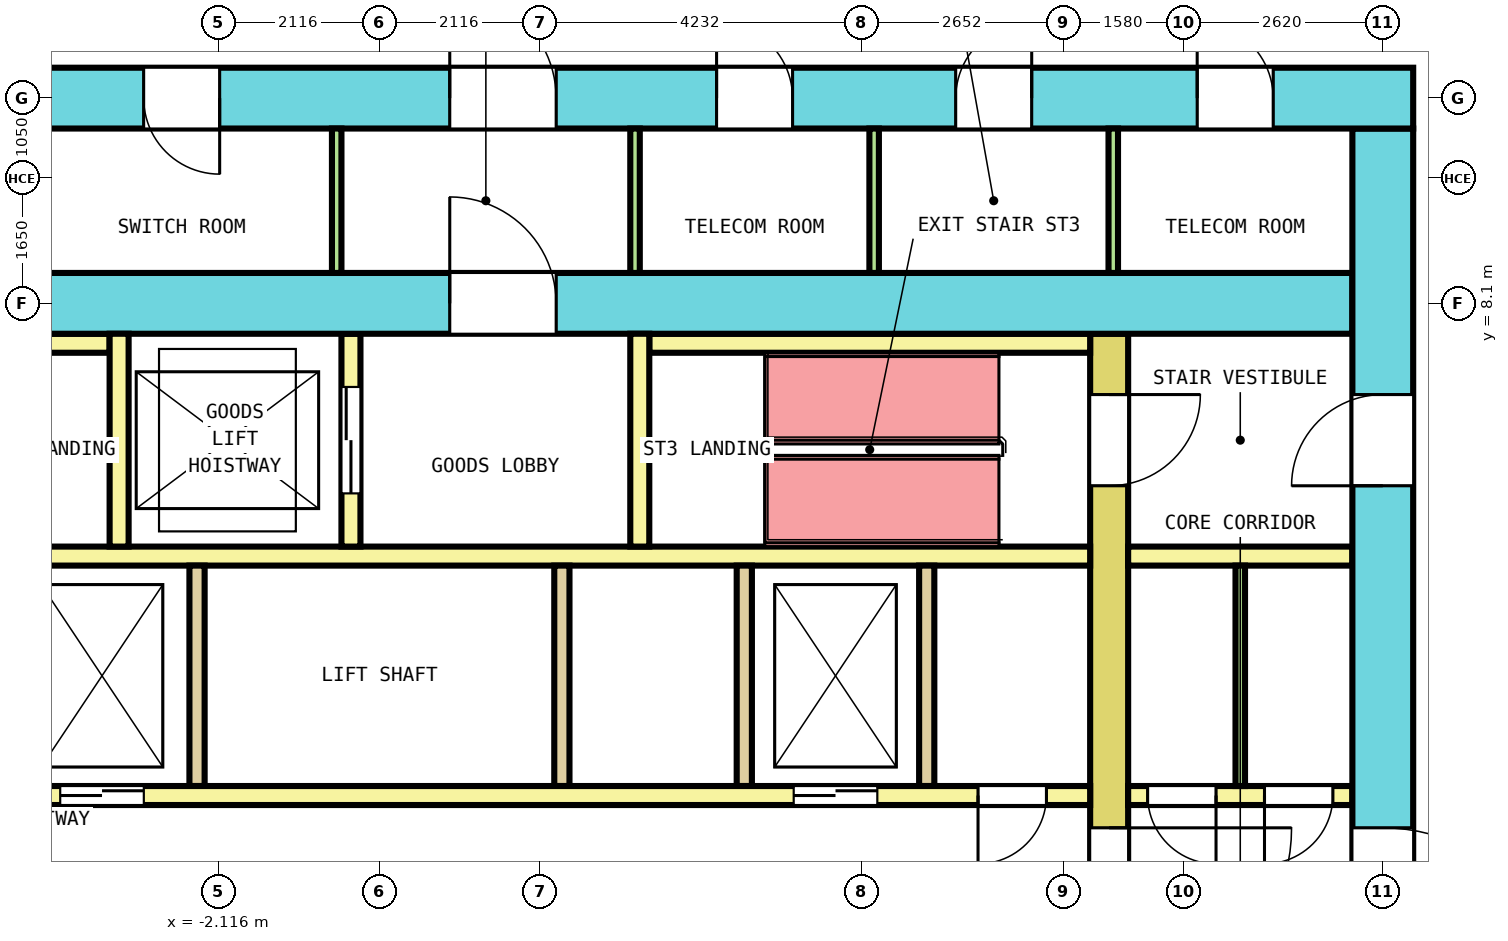
"""IFC4 building model, lengths in metres.
Left out: names, types, materials, properties, quantities, classifications, styles, units other than length and angle.
Written with IfcOpenShell. Run it as: python <this file> out.ifc"""

import sys

from ifc_helpers import new_model, si_unit, direction, frame, frame_2d, origin, place, context, subcontext, project, spatial, rectangle, extrude, element, fill, save


model = new_model("IFC4")
c1 = context("Model", 3, precision=1e-05, world=origin(), true_north=direction((0.0, 1.0)))
c2 = subcontext(c1, "Body", "Model", "MODEL_VIEW")
j1 = project(units=[si_unit("LENGTHUNIT", "METRE"), si_unit("PLANEANGLEUNIT", "RADIAN")], contexts=[c1])
p1 = place(None, origin())
s1 = spatial("IfcSite", under=j1, at=p1, CompositionType="ELEMENT")
p2 = place(p1, origin())
s2 = spatial("IfcBuilding", under=s1, at=p2, CompositionType="ELEMENT")
p3 = place(p2, frame((0.0, 0.0, 117.6)))
s3 = spatial("IfcBuildingStorey", under=s2, at=p3, CompositionType="ELEMENT", Elevation=117.6)
p4 = place(p3, frame((-13.6, 10.8, 0.0), z_axis=(0.0, 0.0, 1.0), x_axis=(1.0, 0.0, 0.0)))
e1 = element("IfcWall", 1, at=p4, inside=s3, PredefinedType="SHEAR", context=c2, shape_type="SweptSolid", body=[
    extrude(rectangle(XDim=27.2, YDim=0.8, at=frame_2d((13.6, 0.0))), origin(), (0.0, 0.0, 1.0), 4.1),
])
p5 = place(p4, frame((2.308, 0.0, 0.0)))
e2 = element("IfcOpeningElement", 2, at=p5, cuts=e1, PredefinedType="OPENING", context=c2, shape_type="SweptSolid", body=[
    extrude(rectangle(XDim=1.0, YDim=2.1, at=frame_2d((0.5, 1.05))), frame((0.0, 0.41, 0.0), z_axis=(0.0, -1.0, 0.0), x_axis=(1.0, 0.0, 0.0)), (0.0, 0.0, 1.0), 0.82),
])
p6 = place(p4, frame((6.419, 0.0, 0.0)))
e3 = element("IfcOpeningElement", 3, at=p6, cuts=e1, PredefinedType="OPENING", context=c2, shape_type="SweptSolid", body=[
    extrude(rectangle(XDim=1.0, YDim=2.1, at=frame_2d((0.5, 1.05))), frame((0.0, 0.41, 0.0), z_axis=(0.0, -1.0, 0.0), x_axis=(1.0, 0.0, 0.0)), (0.0, 0.0, 1.0), 0.82),
])
p7 = place(p4, frame((10.498, 0.0, 0.0)))
e4 = element("IfcOpeningElement", 4, at=p7, cuts=e1, PredefinedType="OPENING", context=c2, shape_type="SweptSolid", body=[
    extrude(rectangle(XDim=1.0, YDim=2.1, at=frame_2d((0.5, 1.05))), frame((0.0, 0.41, 0.0), z_axis=(0.0, -1.0, 0.0), x_axis=(1.0, 0.0, 0.0)), (0.0, 0.0, 1.0), 0.82),
])
p8 = place(p4, frame((18.035, 0.0, 0.0)))
e5 = element("IfcOpeningElement", 5, at=p8, cuts=e1, PredefinedType="OPENING", context=c2, shape_type="SweptSolid", body=[
    extrude(rectangle(XDim=1.0, YDim=2.1, at=frame_2d((0.5, 1.05))), frame((0.0, 0.41, 0.0), z_axis=(0.0, -1.0, 0.0), x_axis=(1.0, 0.0, 0.0)), (0.0, 0.0, 1.0), 0.82),
])
p9 = place(p4, frame((21.181, 0.0, 0.0)))
e6 = element("IfcOpeningElement", 6, at=p9, cuts=e1, PredefinedType="OPENING", context=c2, shape_type="SweptSolid", body=[
    extrude(rectangle(XDim=1.0, YDim=2.1, at=frame_2d((0.5, 1.05))), frame((0.0, 0.41, 0.0), z_axis=(0.0, -1.0, 0.0), x_axis=(1.0, 0.0, 0.0)), (0.0, 0.0, 1.0), 0.82),
])
p10 = place(p4, frame((24.358, 0.0, 0.0)))
e7 = element("IfcOpeningElement", 7, at=p10, cuts=e1, PredefinedType="OPENING", context=c2, shape_type="SweptSolid", body=[
    extrude(rectangle(XDim=1.0, YDim=2.1, at=frame_2d((0.5, 1.05))), frame((0.0, 0.41, 0.0), z_axis=(0.0, -1.0, 0.0), x_axis=(1.0, 0.0, 0.0)), (0.0, 0.0, 1.0), 0.82),
])
p11 = place(p4, frame((14.525, 0.0, 0.0)))
e8 = element("IfcOpeningElement", 8, at=p11, cuts=e1, PredefinedType="OPENING", context=c2, shape_type="SweptSolid", body=[
    extrude(rectangle(XDim=1.4, YDim=2.1, at=frame_2d((0.7, 1.05))), frame((0.0, 0.41, 0.0), z_axis=(0.0, -1.0, 0.0), x_axis=(1.0, 0.0, 0.0)), (0.0, 0.0, 1.0), 0.82),
])
p12 = place(p3, frame((13.2, -10.4, 0.0), z_axis=(0.0, 0.0, 1.0), x_axis=(0.0, 1.0, 0.0)))
e9 = element("IfcWall", 9, at=p12, inside=s3, PredefinedType="SHEAR", context=c2, shape_type="SweptSolid", body=[
    extrude(rectangle(XDim=20.8, YDim=0.8, at=frame_2d((10.4, 0.0))), origin(), (0.0, 0.0, 1.0), 4.1),
])
p13 = place(p12, frame((9.2, 0.0, 0.0)))
e10 = element("IfcOpeningElement", 10, at=p13, cuts=e9, PredefinedType="OPENING", context=c2, shape_type="SweptSolid", body=[
    extrude(rectangle(XDim=2.4, YDim=2.1, at=frame_2d((1.2, 1.05))), frame((0.0, 0.41, 0.0), z_axis=(0.0, -1.0, 0.0), x_axis=(1.0, 0.0, 0.0)), (0.0, 0.0, 1.0), 0.82),
])
p14 = place(p12, frame((16.1, 0.0, 0.0)))
e11 = element("IfcOpeningElement", 11, at=p14, cuts=e9, PredefinedType="OPENING", context=c2, shape_type="SweptSolid", body=[
    extrude(rectangle(XDim=1.2, YDim=2.1, at=frame_2d((0.6, 1.05))), frame((0.0, 0.41, 0.0), z_axis=(0.0, -1.0, 0.0), x_axis=(1.0, 0.0, 0.0)), (0.0, 0.0, 1.0), 0.82),
])
p15 = place(p12, frame((3.6, 0.0, 0.0)))
e12 = element("IfcOpeningElement", 12, at=p15, cuts=e9, PredefinedType="OPENING", context=c2, shape_type="SweptSolid", body=[
    extrude(rectangle(XDim=1.0, YDim=2.1, at=frame_2d((0.5, 1.05))), frame((0.0, 0.41, 0.0), z_axis=(0.0, -1.0, 0.0), x_axis=(1.0, 0.0, 0.0)), (0.0, 0.0, 1.0), 0.82),
])
p16 = place(p3, frame((-12.8, 8.1, 0.0), z_axis=(0.0, 0.0, 1.0), x_axis=(1.0, 0.0, 0.0)))
e13 = element("IfcWall", 13, at=p16, inside=s3, PredefinedType="SHEAR", context=c2, shape_type="SweptSolid", body=[
    extrude(rectangle(XDim=25.6, YDim=0.8, at=frame_2d((12.8, 0.0))), origin(), (0.0, 0.0, 1.0), 4.1),
])
p17 = place(p16, frame((13.725, 0.0, 0.0)))
e14 = element("IfcOpeningElement", 14, at=p17, cuts=e13, PredefinedType="OPENING", context=c2, shape_type="SweptSolid", body=[
    extrude(rectangle(XDim=1.4, YDim=2.1, at=frame_2d((0.7, 1.05))), frame((0.0, 0.41, 0.0), z_axis=(0.0, -1.0, 0.0), x_axis=(1.0, 0.0, 0.0)), (0.0, 0.0, 1.0), 0.82),
])
p18 = place(p3, frame((9.6, -7.7, 0.0), z_axis=(0.0, 0.0, 1.0), x_axis=(0.0, 1.0, 0.0)))
e15 = element("IfcWall", 15, at=p18, inside=s3, PredefinedType="SHEAR", context=c2, shape_type="SweptSolid", body=[
    extrude(rectangle(XDim=15.4, YDim=0.5, at=frame_2d((7.7, 0.0))), origin(), (0.0, 0.0, 1.0), 4.1),
])
p19 = place(p18, frame((6.5, 0.0, 0.0)))
e16 = element("IfcOpeningElement", 16, at=p19, cuts=e15, PredefinedType="OPENING", context=c2, shape_type="SweptSolid", body=[
    extrude(rectangle(XDim=2.4, YDim=2.1, at=frame_2d((1.2, 1.05))), frame((0.0, 0.26, 0.0), z_axis=(0.0, -1.0, 0.0), x_axis=(1.0, 0.0, 0.0)), (0.0, 0.0, 1.0), 0.52),
])
p20 = place(p18, frame((13.4, 0.0, 0.0)))
e17 = element("IfcOpeningElement", 17, at=p20, cuts=e15, PredefinedType="OPENING", context=c2, shape_type="SweptSolid", body=[
    extrude(rectangle(XDim=1.2, YDim=2.1, at=frame_2d((0.6, 1.05))), frame((0.0, 0.26, 0.0), z_axis=(0.0, -1.0, 0.0), x_axis=(1.0, 0.0, 0.0)), (0.0, 0.0, 1.0), 0.52),
])
p21 = place(p18, frame((0.9, 0.0, 0.0)))
e18 = element("IfcOpeningElement", 18, at=p21, cuts=e15, PredefinedType="OPENING", context=c2, shape_type="SweptSolid", body=[
    extrude(rectangle(XDim=1.0, YDim=2.1, at=frame_2d((0.5, 1.05))), frame((0.0, 0.26, 0.0), z_axis=(0.0, -1.0, 0.0), x_axis=(1.0, 0.0, 0.0)), (0.0, 0.0, 1.0), 0.52),
])
p22 = place(p3, frame((-9.35, 1.625, 0.0), z_axis=(0.0, 0.0, 1.0), x_axis=(1.0, 0.0, 0.0)))
e19 = element("IfcWall", 19, at=p22, inside=s3, PredefinedType="SOLIDWALL", context=c2, shape_type="SweptSolid", body=[
    extrude(rectangle(XDim=18.7, YDim=0.25, at=frame_2d((9.35, 0.0))), origin(), (0.0, 0.0, 1.0), 4.1),
])
p23 = place(p22, frame((2.85, 0.0, 0.0)))
e20 = element("IfcOpeningElement", 20, at=p23, cuts=e19, PredefinedType="OPENING", context=c2, shape_type="SweptSolid", body=[
    extrude(rectangle(XDim=1.1, YDim=2.1, at=frame_2d((0.55, 1.05))), frame((0.0, 0.135, 0.0), z_axis=(0.0, -1.0, 0.0), x_axis=(1.0, 0.0, 0.0)), (0.0, 0.0, 1.0), 0.27),
])
p24 = place(p22, frame((5.15, 0.0, 0.0)))
e21 = element("IfcOpeningElement", 21, at=p24, cuts=e19, PredefinedType="OPENING", context=c2, shape_type="SweptSolid", body=[
    extrude(rectangle(XDim=1.1, YDim=2.1, at=frame_2d((0.55, 1.05))), frame((0.0, 0.135, 0.0), z_axis=(0.0, -1.0, 0.0), x_axis=(1.0, 0.0, 0.0)), (0.0, 0.0, 1.0), 0.27),
])
p25 = place(p22, frame((14.8, 0.0, 0.0)))
e22 = element("IfcOpeningElement", 22, at=p25, cuts=e19, PredefinedType="OPENING", context=c2, shape_type="SweptSolid", body=[
    extrude(rectangle(XDim=1.1, YDim=2.1, at=frame_2d((0.55, 1.05))), frame((0.0, 0.135, 0.0), z_axis=(0.0, -1.0, 0.0), x_axis=(1.0, 0.0, 0.0)), (0.0, 0.0, 1.0), 0.27),
])
p26 = place(p22, frame((0.575, 0.0, 0.0)))
e23 = element("IfcOpeningElement", 23, at=p26, cuts=e19, PredefinedType="OPENING", context=c2, shape_type="SweptSolid", body=[
    extrude(rectangle(XDim=0.9, YDim=2.1, at=frame_2d((0.45, 1.05))), frame((0.0, 0.135, 0.0), z_axis=(0.0, -1.0, 0.0), x_axis=(1.0, 0.0, 0.0)), (0.0, 0.0, 1.0), 0.27),
])
p27 = place(p22, frame((17.225, 0.0, 0.0)))
e24 = element("IfcOpeningElement", 24, at=p27, cuts=e19, PredefinedType="OPENING", context=c2, shape_type="SweptSolid", body=[
    extrude(rectangle(XDim=0.9, YDim=2.1, at=frame_2d((0.45, 1.05))), frame((0.0, 0.135, 0.0), z_axis=(0.0, -1.0, 0.0), x_axis=(1.0, 0.0, 0.0)), (0.0, 0.0, 1.0), 0.27),
])
p28 = place(p3, frame((9.85, 1.625, 0.0), z_axis=(0.0, 0.0, 1.0), x_axis=(1.0, 0.0, 0.0)))
e25 = element("IfcWall", 25, at=p28, inside=s3, PredefinedType="SOLIDWALL", context=c2, shape_type="SweptSolid", body=[
    extrude(rectangle(XDim=2.95, YDim=0.25, at=frame_2d((1.475, 0.0))), origin(), (0.0, 0.0, 1.0), 4.1),
])
p29 = place(p28, frame((0.256, 0.0, 0.0)))
e26 = element("IfcOpeningElement", 26, at=p29, cuts=e25, PredefinedType="OPENING", context=c2, shape_type="SweptSolid", body=[
    extrude(rectangle(XDim=0.9, YDim=2.1, at=frame_2d((0.45, 1.05))), frame((0.0, 0.135, 0.0), z_axis=(0.0, -1.0, 0.0), x_axis=(1.0, 0.0, 0.0)), (0.0, 0.0, 1.0), 0.27),
])
p30 = place(p28, frame((1.794, 0.0, 0.0)))
e27 = element("IfcOpeningElement", 27, at=p30, cuts=e25, PredefinedType="OPENING", context=c2, shape_type="SweptSolid", body=[
    extrude(rectangle(XDim=0.9, YDim=2.1, at=frame_2d((0.45, 1.05))), frame((0.0, 0.135, 0.0), z_axis=(0.0, -1.0, 0.0), x_axis=(1.0, 0.0, 0.0)), (0.0, 0.0, 1.0), 0.27),
])
p31 = place(p3, frame((-9.35, 4.775, 0.0), z_axis=(0.0, 0.0, 1.0), x_axis=(1.0, 0.0, 0.0)))
e28 = element("IfcWall", 28, at=p31, inside=s3, PredefinedType="SOLIDWALL", context=c2, shape_type="SweptSolid", body=[
    extrude(rectangle(XDim=18.7, YDim=0.25, at=frame_2d((9.35, 0.0))), origin(), (0.0, 0.0, 1.0), 4.1),
])
p32 = place(p3, frame((9.85, 4.775, 0.0), z_axis=(0.0, 0.0, 1.0), x_axis=(1.0, 0.0, 0.0)))
e29 = element("IfcWall", 29, at=p32, inside=s3, PredefinedType="SOLIDWALL", context=c2, shape_type="SweptSolid", body=[
    extrude(rectangle(XDim=2.95, YDim=0.25, at=frame_2d((1.475, 0.0))), origin(), (0.0, 0.0, 1.0), 4.1),
])
for number, where, z_axis, x_axis in (
    (30, (-2.4, 1.75, 0.0), (0.0, 0.0, 1.0), (0.0, 1.0, 0.0)),
    (31, (2.4, 1.75, 0.0), (0.0, 0.0, 1.0), (0.0, 1.0, 0.0)),
    (32, (4.8, 1.75, 0.0), (0.0, 0.0, 1.0), (0.0, 1.0, 0.0)),
    (33, (7.2, 1.75, 0.0), (0.0, 0.0, 1.0), (0.0, 1.0, 0.0)),
):
    element("IfcWall", number, at=place(p3, frame(where, z_axis=z_axis, x_axis=x_axis)), inside=s3, PredefinedType="SOLIDWALL", context=c2, shape_type="SweptSolid", body=[
        extrude(rectangle(XDim=2.9, YDim=0.2, at=frame_2d((1.45, 0.0))), origin(), (0.0, 0.0, 1.0), 4.1),
    ])
for number, where, z_axis, x_axis in (
    (34, (-9.35, 7.575, 0.0), (0.0, 0.0, 1.0), (1.0, 0.0, 0.0)),
    (35, (3.55, 7.575, 0.0), (0.0, 0.0, 1.0), (1.0, 0.0, 0.0)),
):
    element("IfcWall", number, at=place(p3, frame(where, z_axis=z_axis, x_axis=x_axis)), inside=s3, PredefinedType="SOLIDWALL", context=c2, shape_type="SweptSolid", body=[
        extrude(rectangle(XDim=5.8, YDim=0.25, at=frame_2d((2.9, 0.0))), origin(), (0.0, 0.0, 1.0), 4.1),
    ])
p33 = place(p3, frame((-3.425, 4.9, 0.0), z_axis=(0.0, 0.0, 1.0), x_axis=(0.0, 1.0, 0.0)))
e36 = element("IfcWall", 36, at=p33, inside=s3, PredefinedType="SOLIDWALL", context=c2, shape_type="SweptSolid", body=[
    extrude(rectangle(XDim=2.8, YDim=0.25, at=frame_2d((1.4, 0.0))), origin(), (0.0, 0.0, 1.0), 4.1),
])
p34 = place(p3, frame((-0.375, 4.9, 0.0), z_axis=(0.0, 0.0, 1.0), x_axis=(0.0, 1.0, 0.0)))
e37 = element("IfcWall", 37, at=p34, inside=s3, PredefinedType="SOLIDWALL", context=c2, shape_type="SweptSolid", body=[
    extrude(rectangle(XDim=2.8, YDim=0.25, at=frame_2d((1.4, 0.0))), origin(), (0.0, 0.0, 1.0), 4.1),
])
p35 = place(p34, frame((0.7, 0.0, 0.0)))
e38 = element("IfcOpeningElement", 38, at=p35, cuts=e37, PredefinedType="OPENING", context=c2, shape_type="SweptSolid", body=[
    extrude(rectangle(XDim=1.4, YDim=2.1, at=frame_2d((0.7, 1.05))), frame((0.0, 0.135, 0.0), z_axis=(0.0, -1.0, 0.0), x_axis=(1.0, 0.0, 0.0)), (0.0, 0.0, 1.0), 0.27),
])
p36 = place(p3, frame((3.425, 4.9, 0.0), z_axis=(0.0, 0.0, 1.0), x_axis=(0.0, 1.0, 0.0)))
e39 = element("IfcWall", 39, at=p36, inside=s3, PredefinedType="SOLIDWALL", context=c2, shape_type="SweptSolid", body=[
    extrude(rectangle(XDim=2.8, YDim=0.25, at=frame_2d((1.4, 0.0))), origin(), (0.0, 0.0, 1.0), 4.1),
])
p37 = place(p3, frame((-0.562, 8.5, 0.0), z_axis=(0.0, 0.0, 1.0), x_axis=(0.0, 1.0, 0.0)))
e40 = element("IfcWall", 40, at=p37, inside=s3, PredefinedType="PARTITIONING", context=c2, shape_type="SweptSolid", body=[
    extrude(rectangle(XDim=1.9, YDim=0.125, at=frame_2d((0.95, 0.0))), origin(), (0.0, 0.0, 1.0), 3.05),
])
p38 = place(p3, frame((3.363, 8.5, 0.0), z_axis=(0.0, 0.0, 1.0), x_axis=(0.0, 1.0, 0.0)))
e41 = element("IfcWall", 41, at=p38, inside=s3, PredefinedType="PARTITIONING", context=c2, shape_type="SweptSolid", body=[
    extrude(rectangle(XDim=1.9, YDim=0.125, at=frame_2d((0.95, 0.0))), origin(), (0.0, 0.0, 1.0), 4.1),
])
for number, where, z_axis, x_axis in (
    (42, (6.508, 8.5, 0.0), (0.0, 0.0, 1.0), (0.0, 1.0, 0.0)),
    (43, (9.654, 8.5, 0.0), (0.0, 0.0, 1.0), (0.0, 1.0, 0.0)),
):
    element("IfcWall", number, at=place(p3, frame(where, z_axis=z_axis, x_axis=x_axis)), inside=s3, PredefinedType="PARTITIONING", context=c2, shape_type="SweptSolid", body=[
        extrude(rectangle(XDim=1.9, YDim=0.125, at=frame_2d((0.95, 0.0))), origin(), (0.0, 0.0, 1.0), 3.05),
    ])
p39 = place(p3, frame((11.325, 1.75, 0.0), z_axis=(0.0, 0.0, 1.0), x_axis=(0.0, 1.0, 0.0)))
e44 = element("IfcWall", 44, at=p39, inside=s3, PredefinedType="PARTITIONING", context=c2, shape_type="SweptSolid", body=[
    extrude(rectangle(XDim=2.9, YDim=0.125, at=frame_2d((1.45, 0.0))), origin(), (0.0, 0.0, 1.0), 4.1),
])
p40 = place(p24, origin())
e45 = element("IfcDoor", 45, at=p40, inside=s3, OperationType="DOUBLE_DOOR_SLIDING", PredefinedType="DOOR", context=c2, shape_type="SweptSolid", body=[
    extrude(rectangle(XDim=1.1, YDim=2.1, at=frame_2d((0.55, 1.05))), frame((0.0, 0.075, 0.0), z_axis=(0.0, -1.0, 0.0), x_axis=(1.0, 0.0, 0.0)), (0.0, 0.0, 1.0), 0.15),
])
fill(e21, e45)
p41 = place(p25, origin())
e46 = element("IfcDoor", 46, at=p41, inside=s3, OperationType="DOUBLE_DOOR_SLIDING", PredefinedType="DOOR", context=c2, shape_type="SweptSolid", body=[
    extrude(rectangle(XDim=1.1, YDim=2.1, at=frame_2d((0.55, 1.05))), frame((0.0, 0.075, 0.0), z_axis=(0.0, -1.0, 0.0), x_axis=(1.0, 0.0, 0.0)), (0.0, 0.0, 1.0), 0.15),
])
fill(e22, e46)
p42 = place(p35, origin())
e47 = element("IfcDoor", 47, at=p42, inside=s3, OperationType="DOUBLE_DOOR_SLIDING", PredefinedType="DOOR", context=c2, shape_type="SweptSolid", body=[
    extrude(rectangle(XDim=1.4, YDim=2.1, at=frame_2d((0.7, 1.05))), frame((0.0, 0.075, 0.0), z_axis=(0.0, -1.0, 0.0), x_axis=(1.0, 0.0, 0.0)), (0.0, 0.0, 1.0), 0.15),
])
fill(e38, e47)
p43 = place(p19, origin())
e48 = element("IfcDoor", 48, at=p43, inside=s3, OperationType="DOUBLE_DOOR_SINGLE_SWING", PredefinedType="DOOR", context=c2, shape_type="SweptSolid", body=[
    extrude(rectangle(XDim=2.4, YDim=2.1, at=frame_2d((1.2, 1.05))), frame((0.0, 0.2, 0.0), z_axis=(0.0, -1.0, 0.0), x_axis=(1.0, 0.0, 0.0)), (0.0, 0.0, 1.0), 0.4),
])
fill(e16, e48)
p44 = place(p13, origin())
e49 = element("IfcDoor", 49, at=p44, inside=s3, OperationType="DOUBLE_DOOR_SINGLE_SWING", PredefinedType="DOOR", context=c2, shape_type="SweptSolid", body=[
    extrude(rectangle(XDim=2.4, YDim=2.1, at=frame_2d((1.2, 1.05))), frame((0.0, 0.3, 0.0), z_axis=(0.0, -1.0, 0.0), x_axis=(1.0, 0.0, 0.0)), (0.0, 0.0, 1.0), 0.6),
])
fill(e10, e49)
p45 = place(p20, origin())
e50 = element("IfcDoor", 50, at=p45, inside=s3, OperationType="SINGLE_SWING_LEFT", PredefinedType="DOOR", context=c2, shape_type="SweptSolid", body=[
    extrude(rectangle(XDim=1.2, YDim=2.1, at=frame_2d((0.6, 1.05))), frame((0.0, 0.2, 0.0), z_axis=(0.0, -1.0, 0.0), x_axis=(1.0, 0.0, 0.0)), (0.0, 0.0, 1.0), 0.4),
])
fill(e17, e50)
p46 = place(p14, origin())
e51 = element("IfcDoor", 51, at=p46, inside=s3, OperationType="SINGLE_SWING_RIGHT", PredefinedType="DOOR", context=c2, shape_type="SweptSolid", body=[
    extrude(rectangle(XDim=1.2, YDim=2.1, at=frame_2d((0.6, 1.05))), frame((0.0, 0.3, 0.0), z_axis=(0.0, -1.0, 0.0), x_axis=(1.0, 0.0, 0.0)), (0.0, 0.0, 1.0), 0.6),
])
fill(e11, e51)
p47 = place(p17, origin())
e52 = element("IfcDoor", 52, at=p47, inside=s3, OperationType="DOUBLE_DOOR_SINGLE_SWING", PredefinedType="DOOR", context=c2, shape_type="SweptSolid", body=[
    extrude(rectangle(XDim=1.4, YDim=2.1, at=frame_2d((0.7, 1.05))), frame((0.0, 0.3, 0.0), z_axis=(0.0, -1.0, 0.0), x_axis=(1.0, 0.0, 0.0)), (0.0, 0.0, 1.0), 0.6),
])
fill(e14, e52)
p48 = place(p7, origin())
e53 = element("IfcDoor", 53, at=p48, inside=s3, OperationType="SINGLE_SWING_LEFT", PredefinedType="DOOR", context=c2, shape_type="SweptSolid", body=[
    extrude(rectangle(XDim=1.0, YDim=2.1, at=frame_2d((0.5, 1.05))), frame((0.0, 0.3, 0.0), z_axis=(0.0, -1.0, 0.0), x_axis=(1.0, 0.0, 0.0)), (0.0, 0.0, 1.0), 0.6),
])
fill(e4, e53)
p49 = place(p8, origin())
e54 = element("IfcDoor", 54, at=p49, inside=s3, OperationType="SINGLE_SWING_RIGHT", PredefinedType="DOOR", context=c2, shape_type="SweptSolid", body=[
    extrude(rectangle(XDim=1.0, YDim=2.1, at=frame_2d((0.5, 1.05))), frame((0.0, 0.3, 0.0), z_axis=(0.0, -1.0, 0.0), x_axis=(1.0, 0.0, 0.0)), (0.0, 0.0, 1.0), 0.6),
])
fill(e5, e54)
p50 = place(p9, origin())
e55 = element("IfcDoor", 55, at=p50, inside=s3, OperationType="SINGLE_SWING_LEFT", PredefinedType="DOOR", context=c2, shape_type="SweptSolid", body=[
    extrude(rectangle(XDim=1.0, YDim=2.1, at=frame_2d((0.5, 1.05))), frame((0.0, 0.3, 0.0), z_axis=(0.0, -1.0, 0.0), x_axis=(1.0, 0.0, 0.0)), (0.0, 0.0, 1.0), 0.6),
])
fill(e6, e55)
p51 = place(p10, origin())
e56 = element("IfcDoor", 56, at=p51, inside=s3, OperationType="SINGLE_SWING_RIGHT", PredefinedType="DOOR", context=c2, shape_type="SweptSolid", body=[
    extrude(rectangle(XDim=1.0, YDim=2.1, at=frame_2d((0.5, 1.05))), frame((0.0, 0.3, 0.0), z_axis=(0.0, -1.0, 0.0), x_axis=(1.0, 0.0, 0.0)), (0.0, 0.0, 1.0), 0.6),
])
fill(e7, e56)
p52 = place(p11, origin())
e57 = element("IfcDoor", 57, at=p52, inside=s3, OperationType="DOUBLE_DOOR_SINGLE_SWING", PredefinedType="DOOR", context=c2, shape_type="SweptSolid", body=[
    extrude(rectangle(XDim=1.4, YDim=2.1, at=frame_2d((0.7, 1.05))), frame((0.0, 0.3, 0.0), z_axis=(0.0, -1.0, 0.0), x_axis=(1.0, 0.0, 0.0)), (0.0, 0.0, 1.0), 0.6),
])
fill(e8, e57)
p53 = place(p27, origin())
e58 = element("IfcDoor", 58, at=p53, inside=s3, OperationType="SINGLE_SWING_LEFT", PredefinedType="DOOR", context=c2, shape_type="SweptSolid", body=[
    extrude(rectangle(XDim=0.9, YDim=2.1, at=frame_2d((0.45, 1.05))), frame((0.0, 0.075, 0.0), z_axis=(0.0, -1.0, 0.0), x_axis=(1.0, 0.0, 0.0)), (0.0, 0.0, 1.0), 0.15),
])
fill(e24, e58)
p54 = place(p29, origin())
e59 = element("IfcDoor", 59, at=p54, inside=s3, OperationType="SINGLE_SWING_RIGHT", PredefinedType="DOOR", context=c2, shape_type="SweptSolid", body=[
    extrude(rectangle(XDim=0.9, YDim=2.1, at=frame_2d((0.45, 1.05))), frame((0.0, 0.075, 0.0), z_axis=(0.0, -1.0, 0.0), x_axis=(1.0, 0.0, 0.0)), (0.0, 0.0, 1.0), 0.15),
])
fill(e26, e59)
p55 = place(p30, origin())
e60 = element("IfcDoor", 60, at=p55, inside=s3, OperationType="SINGLE_SWING_LEFT", PredefinedType="DOOR", context=c2, shape_type="SweptSolid", body=[
    extrude(rectangle(XDim=0.9, YDim=2.1, at=frame_2d((0.45, 1.05))), frame((0.0, 0.075, 0.0), z_axis=(0.0, -1.0, 0.0), x_axis=(1.0, 0.0, 0.0)), (0.0, 0.0, 1.0), 0.15),
])
fill(e27, e60)
save(model, sys.argv[1])
